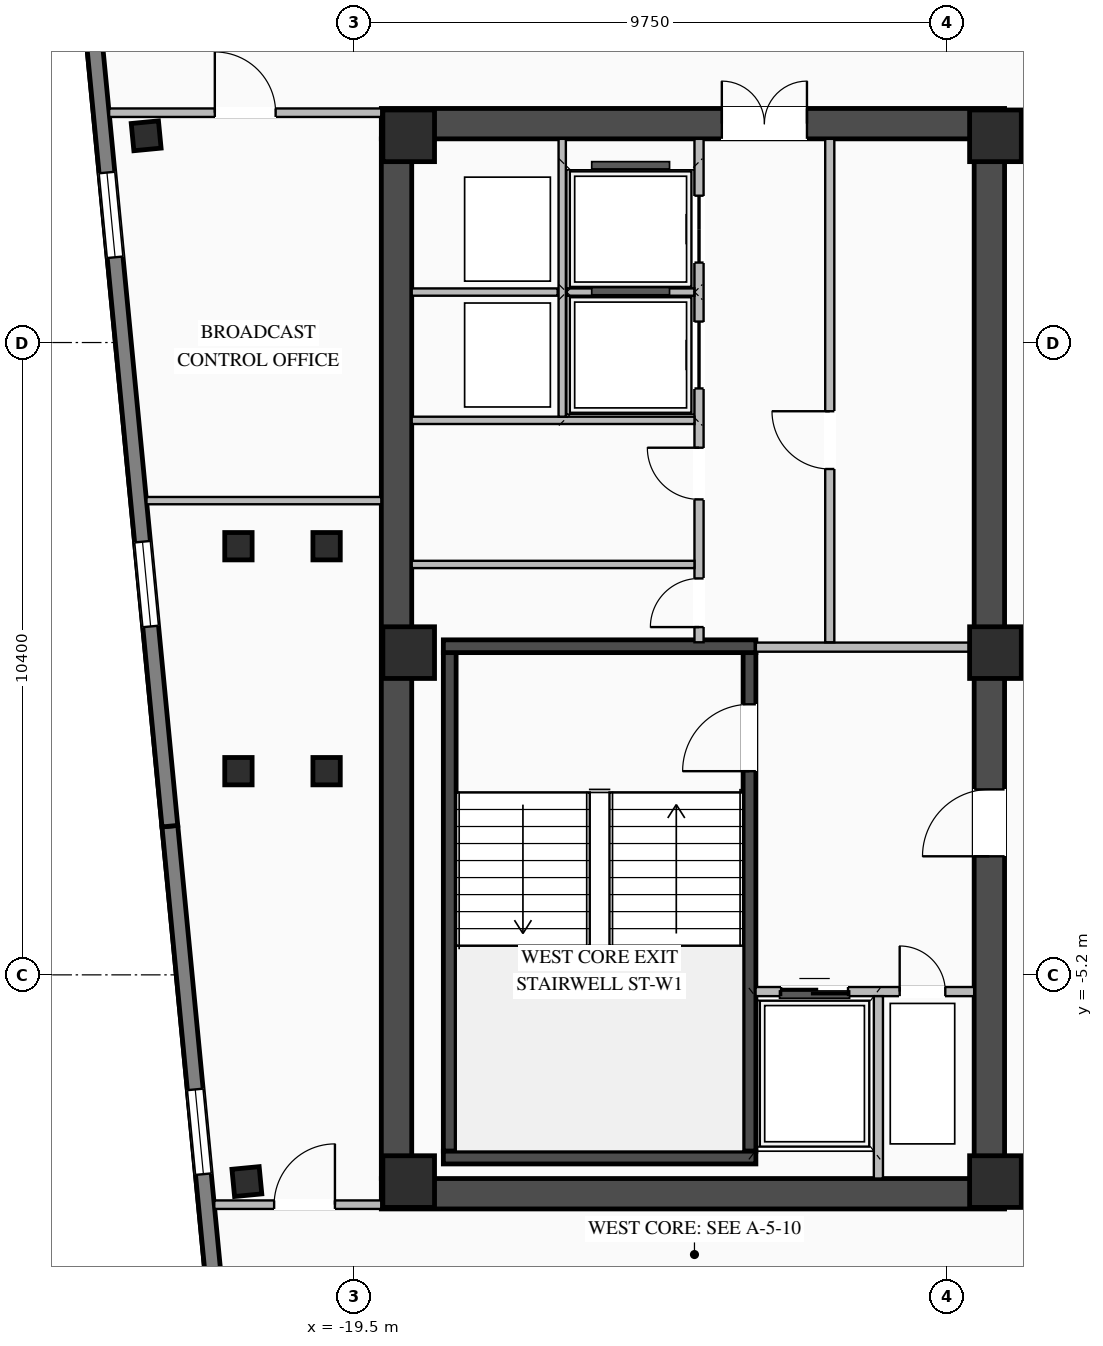
"""IFC4 building model, lengths in metres.
Left out: names, types, materials, properties, quantities, classifications, styles, units other than length and angle.
Written with IfcOpenShell. Run it as: python <this file> out.ifc"""

import sys

from ifc_helpers import new_model, si_unit, direction, frame, frame_2d, origin, origin_2d, place, context, subcontext, project, spatial, rectangle, i_section, extrude, element, fill, save


model = new_model("IFC4")
c1 = context("Model", 3, precision=1e-05, world=origin(), true_north=direction((0.0, 1.0)))
c2 = subcontext(c1, "Body", "Model", "MODEL_VIEW")
j1 = project(units=[si_unit("LENGTHUNIT", "METRE"), si_unit("PLANEANGLEUNIT", "RADIAN")], contexts=[c1])
p1 = place(None, origin())
s1 = spatial("IfcSite", under=j1, at=p1, CompositionType="ELEMENT")
p2 = place(p1, origin())
s2 = spatial("IfcBuilding", under=s1, at=p2, CompositionType="ELEMENT")
p3 = place(p2, frame((0.0, 0.0, 279.3)))
s3 = spatial("IfcBuildingStorey", under=s2, at=p3, CompositionType="ELEMENT", Elevation=279.3)
p4 = place(p3, frame((-19.05, -8.8, 0.0), z_axis=(0.0, 0.0, 1.0), x_axis=(1.0, 0.0, 0.0)))
e1 = element("IfcWall", 1, at=p4, inside=s3, PredefinedType="SHEAR", context=c2, shape_type="SweptSolid", body=[
    extrude(rectangle(XDim=10.25, YDim=0.5, at=frame_2d((5.125, 0.0))), origin(), (0.0, 0.0, 1.0), 3.27),
])
p5 = place(p3, frame((-19.05, 8.8, 0.0), z_axis=(0.0, 0.0, 1.0), x_axis=(1.0, 0.0, 0.0)))
e2 = element("IfcWall", 2, at=p5, inside=s3, PredefinedType="SHEAR", context=c2, shape_type="SweptSolid", body=[
    extrude(rectangle(XDim=10.25, YDim=0.5, at=frame_2d((5.125, 0.0))), origin(), (0.0, 0.0, 1.0), 3.27),
])
p6 = place(p5, frame((5.6, 0.0, 0.0)))
e3 = element("IfcOpeningElement", 3, at=p6, cuts=e2, PredefinedType="OPENING", context=c2, shape_type="SweptSolid", body=[
    extrude(rectangle(XDim=1.4, YDim=2.05, at=frame_2d((0.7, 1.025))), frame((0.0, 0.26, 0.0), z_axis=(0.0, -1.0, 0.0), x_axis=(1.0, 0.0, 0.0)), (0.0, 0.0, 1.0), 0.52),
])
p7 = place(p3, frame((-18.8, -8.55, 0.0), z_axis=(0.0, 0.0, 1.0), x_axis=(0.0, 1.0, 0.0)))
e4 = element("IfcWall", 4, at=p7, inside=s3, PredefinedType="SHEAR", context=c2, shape_type="SweptSolid", body=[
    extrude(rectangle(XDim=17.1, YDim=0.5, at=frame_2d((8.55, 0.0))), origin(), (0.0, 0.0, 1.0), 3.27),
])
p8 = place(p3, frame((-9.05, -8.55, 0.0), z_axis=(0.0, 0.0, 1.0), x_axis=(0.0, 1.0, 0.0)))
e5 = element("IfcWall", 5, at=p8, inside=s3, PredefinedType="SHEAR", context=c2, shape_type="SweptSolid", body=[
    extrude(rectangle(XDim=17.1, YDim=0.5, at=frame_2d((8.55, 0.0))), origin(), (0.0, 0.0, 1.0), 3.27),
])
p9 = place(p8, frame((5.3, 0.0, 0.0)))
e6 = element("IfcOpeningElement", 6, at=p9, cuts=e5, PredefinedType="OPENING", context=c2, shape_type="SweptSolid", body=[
    extrude(rectangle(XDim=1.1, YDim=2.08, at=frame_2d((0.55, 1.04))), frame((0.0, 0.26, 0.0), z_axis=(0.0, -1.0, 0.0), x_axis=(1.0, 0.0, 0.0)), (0.0, 0.0, 1.0), 0.52),
])
p10 = place(p3, frame((-12.995, -8.1, 0.0), z_axis=(0.0, 0.0, 1.0), x_axis=(0.0, 1.0, 0.0)))
e7 = element("IfcWall", 7, at=p10, inside=s3, PredefinedType="SHEAR", context=c2, shape_type="SweptSolid", body=[
    extrude(rectangle(XDim=8.2, YDim=0.21, at=frame_2d((4.1, 0.0))), origin(), (0.0, 0.0, 1.0), 3.27),
])
p11 = place(p10, frame((6.25, 0.0, 0.0)))
e8 = element("IfcOpeningElement", 8, at=p11, cuts=e7, PredefinedType="OPENING", context=c2, shape_type="SweptSolid", body=[
    extrude(rectangle(XDim=1.1, YDim=2.15, at=frame_2d((0.55, 1.075))), frame((0.0, 0.115, 0.0), z_axis=(0.0, -1.0, 0.0), x_axis=(1.0, 0.0, 0.0)), (0.0, 0.0, 1.0), 0.23),
])
p12 = place(p3, frame((-17.925, -8.1, 0.0), z_axis=(0.0, 0.0, 1.0), x_axis=(0.0, 1.0, 0.0)))
e9 = element("IfcWall", 9, at=p12, inside=s3, PredefinedType="SHEAR", context=c2, shape_type="SweptSolid", body=[
    extrude(rectangle(XDim=8.2, YDim=0.21, at=frame_2d((4.1, 0.0))), origin(), (0.0, 0.0, 1.0), 3.27),
])
for number, where, z_axis, x_axis in (
    (10, (-18.03, -8.205, 0.0), (0.0, 0.0, 1.0), (1.0, 0.0, 0.0)),
    (11, (-12.89, 0.205, 0.0), (0.0, 0.0, 1.0), (-1.0, 0.0, 0.0)),
):
    element("IfcWall", number, at=place(p3, frame(where, z_axis=z_axis, x_axis=x_axis)), inside=s3, PredefinedType="SHEAR", context=c2, shape_type="SweptSolid", body=[
        extrude(rectangle(XDim=5.14, YDim=0.21, at=frame_2d((2.57, 0.0))), origin(), (0.0, 0.0, 1.0), 3.27),
    ])
for number, where, z_axis, x_axis in (
    (12, (-8.95, -8.6, 0.0), (0.0, 0.0, 1.0), (1.0, 0.0, 0.0)),
    (13, (-8.95, 0.1, 0.0), (0.0, 0.0, 1.0), (1.0, 0.0, 0.0)),
    (14, (-8.95, 8.6, 0.0), (0.0, 0.0, 1.0), (1.0, 0.0, 0.0)),
    (15, (-18.6, -8.6, 0.0), (0.0, 0.0, 1.0), (1.0, 0.0, 0.0)),
    (16, (-18.6, 0.1, 0.0), (0.0, 0.0, 1.0), (1.0, 0.0, 0.0)),
    (17, (-18.6, 8.6, 0.0), (0.0, 0.0, 1.0), (1.0, 0.0, 0.0)),
):
    element("IfcColumn", number, at=place(p3, frame(where, z_axis=z_axis, x_axis=x_axis)), inside=s3, PredefinedType="COLUMN", context=c2, shape_type="SweptSolid", body=[
        extrude(rectangle(XDim=0.85, YDim=0.85, at=origin_2d()), origin(), (0.0, 0.0, 1.0), 3.45),
    ])
for number, where, z_axis, x_axis in (
    (18, (-21.4, -1.85, 0.0), (0.0, 0.0, 1.0), (1.0, 0.0, 0.0)),
    (19, (-21.4, 1.85, 0.0), (0.0, 0.0, 1.0), (1.0, 0.0, 0.0)),
    (20, (-19.95, -1.85, 0.0), (0.0, 0.0, 1.0), (1.0, 0.0, 0.0)),
    (21, (-19.95, 1.85, 0.0), (0.0, 0.0, 1.0), (1.0, 0.0, 0.0)),
    (22, (-21.261, -8.6, 0.0), (0.0, 0.0, 1.0), (0.995, 0.096, 0.0)),
    (23, (-22.917, 8.6, 0.0), (0.0, 0.0, 1.0), (0.995, 0.096, 0.0)),
):
    element("IfcColumn", number, at=place(p3, frame(where, z_axis=z_axis, x_axis=x_axis)), inside=s3, PredefinedType="COLUMN", context=c2, shape_type="SweptSolid", body=[
        extrude(i_section(OverallWidth=0.45, OverallDepth=0.45, WebThickness=0.022, FlangeThickness=0.032, at=origin_2d()), origin(), (0.0, 0.0, 1.0), 3.45),
    ])
p13 = place(p3, frame((-21.075, -17.834, 0.0), z_axis=(0.0, 0.0, 1.0), x_axis=(-0.095852427869, 0.995395555582, 0.0)))
e24 = element("IfcWall", 24, at=p13, inside=s3, PredefinedType="STANDARD", context=c2, shape_type="SweptSolid", body=[
    extrude(rectangle(XDim=15.15, YDim=0.26, at=frame_2d((7.575, 0.0))), origin(), (0.0, 0.0, 1.0), 2.645),
])
p14 = place(p13, frame((4.35, 0.0, 0.535)))
e25 = element("IfcOpeningElement", 25, at=p14, cuts=e24, PredefinedType="OPENING", context=c2, shape_type="SweptSolid", body=[
    extrude(rectangle(XDim=1.4, YDim=1.95, at=frame_2d((0.7, 0.975))), frame((0.0, 0.14, 0.0), z_axis=(0.0, -1.0, 0.0), x_axis=(1.0, 0.0, 0.0)), (0.0, 0.0, 1.0), 0.28),
])
p15 = place(p13, frame((9.4, 0.0, 0.535)))
e26 = element("IfcOpeningElement", 26, at=p15, cuts=e24, PredefinedType="OPENING", context=c2, shape_type="SweptSolid", body=[
    extrude(rectangle(XDim=1.4, YDim=1.95, at=frame_2d((0.7, 0.975))), frame((0.0, 0.14, 0.0), z_axis=(0.0, -1.0, 0.0), x_axis=(1.0, 0.0, 0.0)), (0.0, 0.0, 1.0), 0.28),
])
p16 = place(p3, frame((-22.527, -2.754, 0.0), z_axis=(0.0, 0.0, 1.0), x_axis=(-0.095850890337, 0.995395703638, 0.0)))
e27 = element("IfcWall", 27, at=p16, inside=s3, PredefinedType="STANDARD", context=c2, shape_type="SweptSolid", body=[
    extrude(rectangle(XDim=15.15, YDim=0.26, at=frame_2d((7.575, 0.0))), origin(), (0.0, 0.0, 1.0), 3.25),
])
p17 = place(p16, frame((3.3, 0.0, 0.76)))
e28 = element("IfcOpeningElement", 28, at=p17, cuts=e27, PredefinedType="OPENING", context=c2, shape_type="SweptSolid", body=[
    extrude(rectangle(XDim=1.4, YDim=1.95, at=frame_2d((0.7, 0.975))), frame((0.0, 0.14, 0.0), z_axis=(0.0, -1.0, 0.0), x_axis=(1.0, 0.0, 0.0)), (0.0, 0.0, 1.0), 0.28),
])
p18 = place(p16, frame((9.4, 0.0, 0.76)))
e29 = element("IfcOpeningElement", 29, at=p18, cuts=e27, PredefinedType="OPENING", context=c2, shape_type="SweptSolid", body=[
    extrude(rectangle(XDim=1.4, YDim=1.95, at=frame_2d((0.7, 0.975))), frame((0.0, 0.14, 0.0), z_axis=(0.0, -1.0, 0.0), x_axis=(1.0, 0.0, 0.0)), (0.0, 0.0, 1.0), 0.28),
])
p19 = place(p3, frame((-12.895, -5.475, 0.0), z_axis=(0.0, 0.0, 1.0), x_axis=(1.0, 0.0, 0.0)))
e30 = element("IfcWall", 30, at=p19, inside=s3, PredefinedType="STANDARD", context=c2, shape_type="SweptSolid", body=[
    extrude(rectangle(XDim=3.595, YDim=0.15, at=frame_2d((1.797, 0.0))), origin(), (0.0, 0.0, 1.0), 3.25),
])
p20 = place(p19, frame((0.42, 0.0, 0.0)))
e31 = element("IfcOpeningElement", 31, at=p20, cuts=e30, PredefinedType="OPENING", context=c2, shape_type="SweptSolid", body=[
    extrude(rectangle(XDim=1.1, YDim=2.15, at=frame_2d((0.55, 1.075))), frame((0.0, 0.085, 0.0), z_axis=(0.0, -1.0, 0.0), x_axis=(1.0, 0.0, 0.0)), (0.0, 0.0, 1.0), 0.17),
])
p21 = place(p19, frame((2.37, 0.0, 0.0)))
e32 = element("IfcOpeningElement", 32, at=p21, cuts=e30, PredefinedType="OPENING", context=c2, shape_type="SweptSolid", body=[
    extrude(rectangle(XDim=0.75, YDim=2.05, at=frame_2d((0.375, 1.025))), frame((0.0, 0.085, 0.0), z_axis=(0.0, -1.0, 0.0), x_axis=(1.0, 0.0, 0.0)), (0.0, 0.0, 1.0), 0.17),
])
p22 = place(p3, frame((-10.875, -8.55, 0.0), z_axis=(0.0, 0.0, 1.0), x_axis=(0.0, 1.0, 0.0)))
e33 = element("IfcWall", 33, at=p22, inside=s3, PredefinedType="STANDARD", context=c2, shape_type="SweptSolid", body=[
    extrude(rectangle(XDim=3.0, YDim=0.15, at=frame_2d((1.5, 0.0))), origin(), (0.0, 0.0, 1.0), 3.25),
])
p23 = place(p3, frame((-12.89, 0.19, 0.0), z_axis=(0.0, 0.0, 1.0), x_axis=(1.0, 0.0, 0.0)))
e34 = element("IfcWall", 34, at=p23, inside=s3, PredefinedType="STANDARD", context=c2, shape_type="SweptSolid", body=[
    extrude(rectangle(XDim=3.59, YDim=0.15, at=frame_2d((1.795, 0.0))), origin(), (0.0, 0.0, 1.0), 2.645),
])
p24 = place(p3, frame((-11.675, 0.27, 0.0), z_axis=(0.0, 0.0, 1.0), x_axis=(0.0, 1.0, 0.0)))
e35 = element("IfcWall", 35, at=p24, inside=s3, PredefinedType="STANDARD", context=c2, shape_type="SweptSolid", body=[
    extrude(rectangle(XDim=8.28, YDim=0.15, at=frame_2d((4.14, 0.0))), origin(), (0.0, 0.0, 1.0), 3.25),
])
p25 = place(p24, frame((2.85, 0.0, 0.0)))
e36 = element("IfcOpeningElement", 36, at=p25, cuts=e35, PredefinedType="OPENING", context=c2, shape_type="SweptSolid", body=[
    extrude(rectangle(XDim=0.95, YDim=2.05, at=frame_2d((0.475, 1.025))), frame((0.0, 0.085, 0.0), z_axis=(0.0, -1.0, 0.0), x_axis=(1.0, 0.0, 0.0)), (0.0, 0.0, 1.0), 0.17),
])
p26 = place(p3, frame((-13.825, 0.27, 0.0), z_axis=(0.0, 0.0, 1.0), x_axis=(0.0, 1.0, 0.0)))
e37 = element("IfcWall", 37, at=p26, inside=s3, PredefinedType="STANDARD", context=c2, shape_type="SweptSolid", body=[
    extrude(rectangle(XDim=8.28, YDim=0.15, at=frame_2d((4.14, 0.0))), origin(), (0.0, 0.0, 1.0), 3.25),
])
p27 = place(p26, frame((4.175, 0.0, 0.0)))
e38 = element("IfcOpeningElement", 38, at=p27, cuts=e37, PredefinedType="OPENING", context=c2, shape_type="SweptSolid", body=[
    extrude(rectangle(XDim=1.1, YDim=2.1, at=frame_2d((0.55, 1.05))), frame((0.0, 0.085, 0.0), z_axis=(0.0, -1.0, 0.0), x_axis=(1.0, 0.0, 0.0)), (0.0, 0.0, 1.0), 0.17),
])
p28 = place(p26, frame((6.245, 0.0, 0.0)))
e39 = element("IfcOpeningElement", 39, at=p28, cuts=e37, PredefinedType="OPENING", context=c2, shape_type="SweptSolid", body=[
    extrude(rectangle(XDim=1.1, YDim=2.1, at=frame_2d((0.55, 1.05))), frame((0.0, 0.085, 0.0), z_axis=(0.0, -1.0, 0.0), x_axis=(1.0, 0.0, 0.0)), (0.0, 0.0, 1.0), 0.17),
])
p29 = place(p26, frame((0.25, 0.0, 0.0)))
e40 = element("IfcOpeningElement", 40, at=p29, cuts=e37, PredefinedType="OPENING", context=c2, shape_type="SweptSolid", body=[
    extrude(rectangle(XDim=0.8, YDim=2.05, at=frame_2d((0.4, 1.025))), frame((0.0, 0.085, 0.0), z_axis=(0.0, -1.0, 0.0), x_axis=(1.0, 0.0, 0.0)), (0.0, 0.0, 1.0), 0.17),
])
p30 = place(p26, frame((2.35, 0.0, 0.0)))
e41 = element("IfcOpeningElement", 41, at=p30, cuts=e37, PredefinedType="OPENING", context=c2, shape_type="SweptSolid", body=[
    extrude(rectangle(XDim=0.85, YDim=2.05, at=frame_2d((0.425, 1.025))), frame((0.0, 0.085, 0.0), z_axis=(0.0, -1.0, 0.0), x_axis=(1.0, 0.0, 0.0)), (0.0, 0.0, 1.0), 0.17),
])
p31 = place(p3, frame((-18.55, 3.92, 0.0), z_axis=(0.0, 0.0, 1.0), x_axis=(1.0, 0.0, 0.0)))
e42 = element("IfcWall", 42, at=p31, inside=s3, PredefinedType="STANDARD", context=c2, shape_type="SweptSolid", body=[
    extrude(rectangle(XDim=4.65, YDim=0.12, at=frame_2d((2.325, 0.0))), origin(), (0.0, 0.0, 1.0), 3.25),
])
p32 = place(p3, frame((-18.55, 6.03, 0.0), z_axis=(0.0, 0.0, 1.0), x_axis=(1.0, 0.0, 0.0)))
e43 = element("IfcWall", 43, at=p32, inside=s3, PredefinedType="STANDARD", context=c2, shape_type="SweptSolid", body=[
    extrude(rectangle(XDim=2.4, YDim=0.12, at=frame_2d((1.2, 0.0))), origin(), (0.0, 0.0, 1.0), 3.25),
])
p33 = place(p3, frame((-16.075, 3.98, 0.0), z_axis=(0.0, 0.0, 1.0), x_axis=(0.0, 1.0, 0.0)))
e44 = element("IfcWall", 44, at=p33, inside=s3, PredefinedType="STANDARD", context=c2, shape_type="SweptSolid", body=[
    extrude(rectangle(XDim=4.57, YDim=0.12, at=frame_2d((2.285, 0.0))), origin(), (0.0, 0.0, 1.0), 3.25),
])
p34 = place(p3, frame((-16.0, 6.03, 0.0), z_axis=(0.0, 0.0, 1.0), x_axis=(1.0, 0.0, 0.0)))
e45 = element("IfcWall", 45, at=p34, inside=s3, PredefinedType="STANDARD", context=c2, shape_type="SweptSolid", body=[
    extrude(rectangle(XDim=2.1, YDim=0.12, at=frame_2d((1.05, 0.0))), origin(), (0.0, 0.0, 1.0), 3.25),
])
p35 = place(p3, frame((-18.55, 1.55, 0.0), z_axis=(0.0, 0.0, 1.0), x_axis=(1.0, 0.0, 0.0)))
e46 = element("IfcWall", 46, at=p35, inside=s3, PredefinedType="STANDARD", context=c2, shape_type="SweptSolid", body=[
    extrude(rectangle(XDim=4.65, YDim=0.12, at=frame_2d((2.325, 0.0))), origin(), (0.0, 0.0, 1.0), 3.25),
])
p36 = place(p3, frame((-23.527, 8.98, 0.0), z_axis=(0.0, 0.0, 1.0), x_axis=(1.0, 0.0, 0.0)))
e47 = element("IfcWall", 47, at=p36, inside=s3, PredefinedType="STANDARD", context=c2, shape_type="SweptSolid", body=[
    extrude(rectangle(XDim=4.477, YDim=0.14, at=frame_2d((2.238, 0.0))), origin(), (0.0, 0.0, 1.0), 3.25),
])
p37 = place(p36, frame((1.738, 0.0, 0.0)))
e48 = element("IfcOpeningElement", 48, at=p37, cuts=e47, PredefinedType="OPENING", context=c2, shape_type="SweptSolid", body=[
    extrude(rectangle(XDim=1.0, YDim=2.08, at=frame_2d((0.5, 1.04))), frame((0.0, 0.08, 0.0), z_axis=(0.0, -1.0, 0.0), x_axis=(1.0, 0.0, 0.0)), (0.0, 0.0, 1.0), 0.16),
])
p38 = place(p3, frame((-21.797, -8.98, 0.0), z_axis=(0.0, 0.0, 1.0), x_axis=(1.0, 0.0, 0.0)))
e49 = element("IfcWall", 49, at=p38, inside=s3, PredefinedType="STANDARD", context=c2, shape_type="SweptSolid", body=[
    extrude(rectangle(XDim=2.747, YDim=0.14, at=frame_2d((1.374, 0.0))), origin(), (0.0, 0.0, 1.0), 3.25),
])
p39 = place(p38, frame((0.984, 0.0, 0.0)))
e50 = element("IfcOpeningElement", 50, at=p39, cuts=e49, PredefinedType="OPENING", context=c2, shape_type="SweptSolid", body=[
    extrude(rectangle(XDim=1.0, YDim=2.08, at=frame_2d((0.5, 1.04))), frame((0.0, 0.08, 0.0), z_axis=(0.0, -1.0, 0.0), x_axis=(1.0, 0.0, 0.0)), (0.0, 0.0, 1.0), 0.16),
])
p40 = place(p3, frame((-22.912, 2.6, 0.0), z_axis=(0.0, 0.0, 1.0), x_axis=(1.0, 0.0, 0.0)))
e51 = element("IfcWall", 51, at=p40, inside=s3, PredefinedType="STANDARD", context=c2, shape_type="SweptSolid", body=[
    extrude(rectangle(XDim=3.862, YDim=0.12, at=frame_2d((1.931, 0.0))), origin(), (0.0, 0.0, 1.0), 3.25),
])
p41 = place(p15, origin())
e52 = element("IfcWindow", 52, at=p41, inside=s3, PartitioningType="SINGLE_PANEL", PredefinedType="WINDOW", context=c2, shape_type="SweptSolid", body=[
    extrude(rectangle(XDim=1.4, YDim=1.95, at=frame_2d((0.7, 0.975))), frame((0.0, 0.03, 0.0), z_axis=(0.0, -1.0, 0.0), x_axis=(1.0, 0.0, 0.0)), (0.0, 0.0, 1.0), 0.06),
])
fill(e26, e52)
p42 = place(p17, origin())
e53 = element("IfcWindow", 53, at=p42, inside=s3, PartitioningType="SINGLE_PANEL", PredefinedType="WINDOW", context=c2, shape_type="SweptSolid", body=[
    extrude(rectangle(XDim=1.4, YDim=1.95, at=frame_2d((0.7, 0.975))), frame((0.0, 0.03, 0.0), z_axis=(0.0, -1.0, 0.0), x_axis=(1.0, 0.0, 0.0)), (0.0, 0.0, 1.0), 0.06),
])
fill(e28, e53)
p43 = place(p18, origin())
e54 = element("IfcWindow", 54, at=p43, inside=s3, PartitioningType="SINGLE_PANEL", PredefinedType="WINDOW", context=c2, shape_type="SweptSolid", body=[
    extrude(rectangle(XDim=1.4, YDim=1.95, at=frame_2d((0.7, 0.975))), frame((0.0, 0.03, 0.0), z_axis=(0.0, -1.0, 0.0), x_axis=(1.0, 0.0, 0.0)), (0.0, 0.0, 1.0), 0.06),
])
fill(e29, e54)
p44 = place(p11, origin())
e55 = element("IfcDoor", 55, at=p44, inside=s3, OperationType="SINGLE_SWING_LEFT", PredefinedType="DOOR", context=c2, shape_type="SweptSolid", body=[
    extrude(rectangle(XDim=1.1, YDim=2.15, at=frame_2d((0.55, 1.075))), frame((0.0, 0.025, 0.0), z_axis=(0.0, -1.0, 0.0), x_axis=(1.0, 0.0, 0.0)), (0.0, 0.0, 1.0), 0.05),
])
fill(e8, e55)
p45 = place(p20, origin())
e56 = element("IfcDoor", 56, at=p45, inside=s3, OperationType="DOUBLE_DOOR_SLIDING", PredefinedType="DOOR", context=c2, shape_type="SweptSolid", body=[
    extrude(rectangle(XDim=1.1, YDim=2.15, at=frame_2d((0.55, 1.075))), frame((0.0, 0.025, 0.0), z_axis=(0.0, -1.0, 0.0), x_axis=(1.0, 0.0, 0.0)), (0.0, 0.0, 1.0), 0.05),
])
fill(e31, e56)
p46 = place(p21, origin())
e57 = element("IfcDoor", 57, at=p46, inside=s3, OperationType="SINGLE_SWING_LEFT", PredefinedType="DOOR", context=c2, shape_type="SweptSolid", body=[
    extrude(rectangle(XDim=0.75, YDim=2.05, at=frame_2d((0.375, 1.025))), frame((0.0, 0.025, 0.0), z_axis=(0.0, -1.0, 0.0), x_axis=(1.0, 0.0, 0.0)), (0.0, 0.0, 1.0), 0.05),
])
fill(e32, e57)
p47 = place(p9, origin())
e58 = element("IfcDoor", 58, at=p47, inside=s3, OperationType="SINGLE_SWING_LEFT", PredefinedType="DOOR", context=c2, shape_type="SweptSolid", body=[
    extrude(rectangle(XDim=1.1, YDim=2.08, at=frame_2d((0.55, 1.04))), frame((0.0, 0.205, 0.0), z_axis=(0.0, -1.0, 0.0), x_axis=(1.0, 0.0, 0.0)), (0.0, 0.0, 1.0), 0.05),
])
fill(e6, e58)
p48 = place(p6, origin())
e59 = element("IfcDoor", 59, at=p48, inside=s3, OperationType="DOUBLE_DOOR_SINGLE_SWING", PredefinedType="DOOR", context=c2, shape_type="SweptSolid", body=[
    extrude(rectangle(XDim=1.4, YDim=2.05, at=frame_2d((0.7, 1.025))), frame((0.0, 0.195, 0.0), z_axis=(0.0, -1.0, 0.0), x_axis=(1.0, 0.0, 0.0)), (0.0, 0.0, 1.0), 0.05),
])
fill(e3, e59)
p49 = place(p25, origin())
e60 = element("IfcDoor", 60, at=p49, inside=s3, OperationType="SINGLE_SWING_RIGHT", PredefinedType="DOOR", context=c2, shape_type="SweptSolid", body=[
    extrude(rectangle(XDim=0.95, YDim=2.05, at=frame_2d((0.475, 1.025))), frame((0.0, 0.025, 0.0), z_axis=(0.0, -1.0, 0.0), x_axis=(1.0, 0.0, 0.0)), (0.0, 0.0, 1.0), 0.05),
])
fill(e36, e60)
p50 = place(p27, origin())
e61 = element("IfcDoor", 61, at=p50, inside=s3, OperationType="DOUBLE_DOOR_SLIDING", PredefinedType="DOOR", context=c2, shape_type="SweptSolid", body=[
    extrude(rectangle(XDim=1.1, YDim=2.1, at=frame_2d((0.55, 1.05))), frame((0.0, 0.025, 0.0), z_axis=(0.0, -1.0, 0.0), x_axis=(1.0, 0.0, 0.0)), (0.0, 0.0, 1.0), 0.05),
])
fill(e38, e61)
p51 = place(p28, origin())
e62 = element("IfcDoor", 62, at=p51, inside=s3, OperationType="DOUBLE_DOOR_SLIDING", PredefinedType="DOOR", context=c2, shape_type="SweptSolid", body=[
    extrude(rectangle(XDim=1.1, YDim=2.1, at=frame_2d((0.55, 1.05))), frame((0.0, 0.025, 0.0), z_axis=(0.0, -1.0, 0.0), x_axis=(1.0, 0.0, 0.0)), (0.0, 0.0, 1.0), 0.05),
])
fill(e39, e62)
p52 = place(p29, origin())
e63 = element("IfcDoor", 63, at=p52, inside=s3, OperationType="SINGLE_SWING_LEFT", PredefinedType="DOOR", context=c2, shape_type="SweptSolid", body=[
    extrude(rectangle(XDim=0.8, YDim=2.05, at=frame_2d((0.4, 1.025))), frame((0.0, 0.025, 0.0), z_axis=(0.0, -1.0, 0.0), x_axis=(1.0, 0.0, 0.0)), (0.0, 0.0, 1.0), 0.05),
])
fill(e40, e63)
p53 = place(p30, origin())
e64 = element("IfcDoor", 64, at=p53, inside=s3, OperationType="SINGLE_SWING_RIGHT", PredefinedType="DOOR", context=c2, shape_type="SweptSolid", body=[
    extrude(rectangle(XDim=0.85, YDim=2.05, at=frame_2d((0.425, 1.025))), frame((0.0, 0.025, 0.0), z_axis=(0.0, -1.0, 0.0), x_axis=(1.0, 0.0, 0.0)), (0.0, 0.0, 1.0), 0.05),
])
fill(e41, e64)
p54 = place(p37, origin())
e65 = element("IfcDoor", 65, at=p54, inside=s3, OperationType="SINGLE_SWING_LEFT", PredefinedType="DOOR", context=c2, shape_type="SweptSolid", body=[
    extrude(rectangle(XDim=1.0, YDim=2.08, at=frame_2d((0.5, 1.04))), frame((0.0, 0.025, 0.0), z_axis=(0.0, -1.0, 0.0), x_axis=(1.0, 0.0, 0.0)), (0.0, 0.0, 1.0), 0.05),
])
fill(e48, e65)
p55 = place(p39, origin())
e66 = element("IfcDoor", 66, at=p55, inside=s3, OperationType="SINGLE_SWING_RIGHT", PredefinedType="DOOR", context=c2, shape_type="SweptSolid", body=[
    extrude(rectangle(XDim=1.0, YDim=2.08, at=frame_2d((0.5, 1.04))), frame((0.0, 0.025, 0.0), z_axis=(0.0, -1.0, 0.0), x_axis=(1.0, 0.0, 0.0)), (0.0, 0.0, 1.0), 0.05),
])
fill(e50, e66)
save(model, sys.argv[1])
